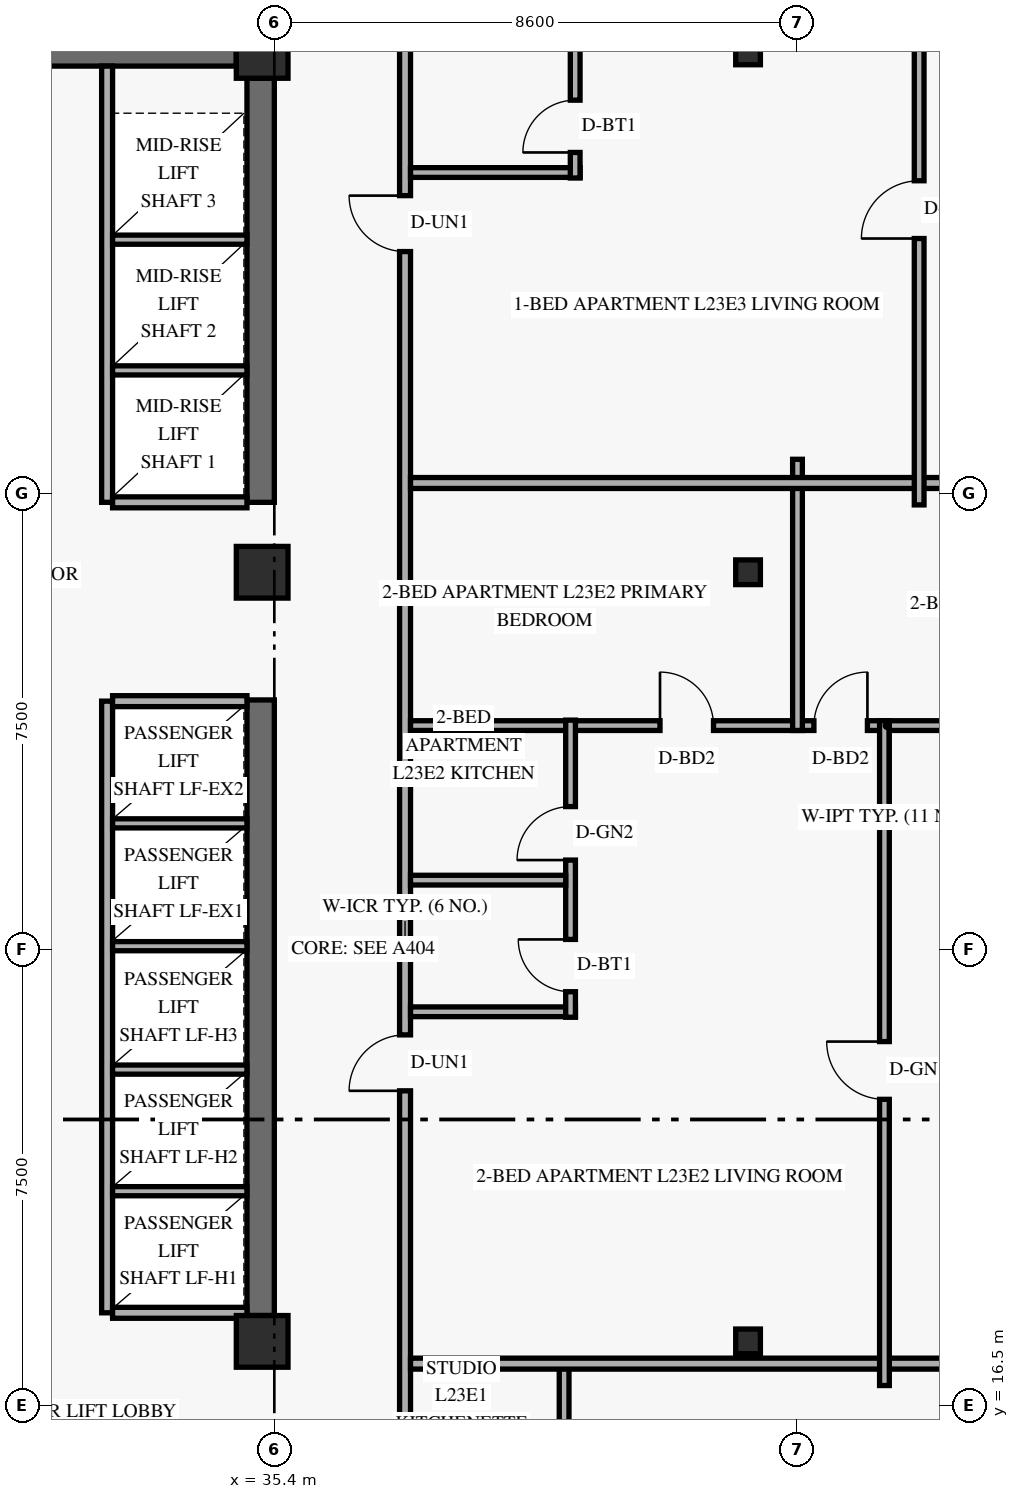
"""IFC4 building model, lengths in metres.
Left out: names, types, materials, properties, quantities, classifications, styles, units other than length and angle.
Written with IfcOpenShell. Run it as: python <this file> out.ifc"""

import sys

from ifc_helpers import new_model, si_unit, direction, frame, frame_2d, origin, origin_2d, place, context, subcontext, project, spatial, rectangle, hollow_rectangle, extrude, element, fill, save


model = new_model("IFC4")
c1 = context("Model", 3, precision=1e-05, world=origin(), true_north=direction((0.0, 1.0)))
c2 = subcontext(c1, "Body", "Model", "MODEL_VIEW")
j1 = project(units=[si_unit("LENGTHUNIT", "METRE"), si_unit("PLANEANGLEUNIT", "RADIAN")], contexts=[c1])
p1 = place(None, origin())
s1 = spatial("IfcSite", under=j1, at=p1, CompositionType="ELEMENT")
p2 = place(p1, origin())
s2 = spatial("IfcBuilding", under=s1, at=p2, CompositionType="ELEMENT")
p3 = place(p2, frame((0.0, 0.0, 91.2)))
s3 = spatial("IfcBuildingStorey", under=s2, at=p3, CompositionType="ELEMENT", Elevation=91.2)
p4 = place(p3, frame((35.175, 17.975, 0.0), z_axis=(0.0, 0.0, 1.0), x_axis=(0.0, 1.0, 0.0)))
e1 = element("IfcWall", 1, at=p4, inside=s3, PredefinedType="SHEAR", context=c2, shape_type="SweptSolid", body=[
    extrude(rectangle(XDim=10.125, YDim=0.45, at=frame_2d((5.062, 0.0))), origin(), (0.0, 0.0, 1.0), 2.749),
])
p5 = place(p3, frame((35.175, 31.35, 0.0), z_axis=(0.0, 0.0, 1.0), x_axis=(0.0, 1.0, 0.0)))
e2 = element("IfcWall", 2, at=p5, inside=s3, PredefinedType="SHEAR", context=c2, shape_type="SweptSolid", body=[
    extrude(rectangle(XDim=6.975, YDim=0.45, at=frame_2d((3.487, 0.0))), origin(), (0.0, 0.0, 1.0), 2.749),
])
p6 = place(p3, frame((24.625, 38.75, 0.0), z_axis=(0.0, 0.0, 1.0), x_axis=(1.0, 0.0, 0.0)))
e3 = element("IfcWall", 3, at=p6, inside=s3, PredefinedType="SHEAR", context=c2, shape_type="SweptSolid", body=[
    extrude(rectangle(XDim=10.15, YDim=0.45, at=frame_2d((5.075, 0.0))), origin(), (0.0, 0.0, 1.0), 3.36),
])
for number, where, z_axis, x_axis in (
    (4, (35.2, 17.55, 0.0), (0.0, 0.0, 1.0), (1.0, 0.0, 0.0)),
    (5, (35.2, 30.2, 0.0), (0.0, 0.0, 1.0), (1.0, 0.0, 0.0)),
    (6, (35.2, 38.75, 0.0), (0.0, 0.0, 1.0), (1.0, 0.0, 0.0)),
):
    element("IfcColumn", number, at=place(p3, frame(where, z_axis=z_axis, x_axis=x_axis)), inside=s3, PredefinedType="COLUMN", context=c2, shape_type="SweptSolid", body=[
        extrude(rectangle(XDim=0.85, YDim=0.85, at=origin_2d()), origin(), (0.0, 0.0, 1.0), 3.6),
    ])
for number, where, z_axis, x_axis in (
    (7, (43.128, 17.55, 0.0), (0.035, 0.0, 0.999), (0.0, 1.0, 0.0)),
    (8, (43.128, 30.2, 0.0), (0.035, 0.0, 0.999), (0.0, 1.0, 0.0)),
    (9, (43.128, 38.75, 0.0), (0.035, 0.0, 0.999), (0.0, 1.0, 0.0)),
):
    element("IfcColumn", number, at=place(p3, frame(where, z_axis=z_axis, x_axis=x_axis)), inside=s3, PredefinedType="COLUMN", context=c2, shape_type="SweptSolid", body=[
        extrude(hollow_rectangle(XDim=0.406, YDim=0.406, WallThickness=0.016, at=origin_2d()), origin(), (0.0, 0.0, 1.0), 3.602),
    ])
p7 = place(p3, frame((32.65, 18.02, 0.0), z_axis=(0.0, 0.0, 1.0), x_axis=(0.0, 1.0, 0.0)))
e10 = element("IfcWall", 10, at=p7, inside=s3, PredefinedType="STANDARD", context=c2, shape_type="SweptSolid", body=[
    extrude(rectangle(XDim=10.06, YDim=0.18, at=frame_2d((5.03, 0.0))), origin(), (0.0, 0.0, 1.0), 3.36),
])
for number, where, z_axis, x_axis in (
    (11, (32.74, 18.02, 0.0), (0.0, 0.0, 1.0), (1.0, 0.0, 0.0)),
    (12, (32.74, 28.08, 0.0), (0.0, 0.0, 1.0), (1.0, 0.0, 0.0)),
):
    element("IfcWall", number, at=place(p3, frame(where, z_axis=z_axis, x_axis=x_axis)), inside=s3, PredefinedType="STANDARD", context=c2, shape_type="SweptSolid", body=[
        extrude(rectangle(XDim=2.21, YDim=0.18, at=frame_2d((1.105, 0.0))), origin(), (0.0, 0.0, 1.0), 3.36),
    ])
for number, where, z_axis, x_axis in (
    (13, (32.74, 20.02, 0.0), (0.0, 0.0, 1.0), (1.0, 0.0, 0.0)),
    (14, (32.74, 22.02, 0.0), (0.0, 0.0, 1.0), (1.0, 0.0, 0.0)),
    (15, (32.74, 24.05, 0.0), (0.0, 0.0, 1.0), (1.0, 0.0, 0.0)),
    (16, (32.74, 26.07, 0.0), (0.0, 0.0, 1.0), (1.0, 0.0, 0.0)),
):
    element("IfcWall", number, at=place(p3, frame(where, z_axis=z_axis, x_axis=x_axis)), inside=s3, PredefinedType="STANDARD", context=c2, shape_type="SweptSolid", body=[
        extrude(rectangle(XDim=2.21, YDim=0.15, at=frame_2d((1.105, 0.0))), origin(), (0.0, 0.0, 1.0), 3.36),
    ])
p8 = place(p3, frame((32.65, 31.35, 0.0), z_axis=(0.0, 0.0, 1.0), x_axis=(0.0, 1.0, 0.0)))
e17 = element("IfcWall", 17, at=p8, inside=s3, PredefinedType="STANDARD", context=c2, shape_type="SweptSolid", body=[
    extrude(rectangle(XDim=7.175, YDim=0.18, at=frame_2d((3.587, 0.0))), origin(), (0.0, 0.0, 1.0), 3.36),
])
p9 = place(p3, frame((32.74, 31.35, 0.0), z_axis=(0.0, 0.0, 1.0), x_axis=(1.0, 0.0, 0.0)))
e18 = element("IfcWall", 18, at=p9, inside=s3, PredefinedType="STANDARD", context=c2, shape_type="SweptSolid", body=[
    extrude(rectangle(XDim=2.21, YDim=0.18, at=frame_2d((1.105, 0.0))), origin(), (0.0, 0.0, 1.0), 3.36),
])
for number, where, z_axis, x_axis in (
    (19, (32.74, 33.52, 0.0), (0.0, 0.0, 1.0), (1.0, 0.0, 0.0)),
    (20, (32.74, 35.67, 0.0), (0.0, 0.0, 1.0), (1.0, 0.0, 0.0)),
):
    element("IfcWall", number, at=place(p3, frame(where, z_axis=z_axis, x_axis=x_axis)), inside=s3, PredefinedType="STANDARD", context=c2, shape_type="SweptSolid", body=[
        extrude(rectangle(XDim=2.21, YDim=0.15, at=frame_2d((1.105, 0.0))), origin(), (0.0, 0.0, 1.0), 3.36),
    ])
p10 = place(p3, frame((37.55, 2.98, 0.0), z_axis=(0.0, 0.0, 1.0), x_axis=(0.0, 1.0, 0.0)))
e21 = element("IfcWall", 21, at=p10, inside=s3, PredefinedType="STANDARD", context=c2, shape_type="SweptSolid", body=[
    extrude(rectangle(XDim=42.04, YDim=0.18, at=frame_2d((21.02, 0.0))), origin(), (0.0, 0.0, 1.0), 2.731),
])
p11 = place(p10, frame((8.264, 0.0, 0.0)))
e22 = element("IfcOpeningElement", 22, at=p11, cuts=e21, PredefinedType="OPENING", context=c2, shape_type="SweptSolid", body=[
    extrude(rectangle(XDim=0.92, YDim=2.15, at=frame_2d((0.46, 1.075))), frame((0.0, 0.1, 0.0), z_axis=(0.0, -1.0, 0.0), x_axis=(1.0, 0.0, 0.0)), (0.0, 0.0, 1.0), 0.2),
])
p12 = place(p10, frame((18.691, 0.0, 0.0)))
e23 = element("IfcOpeningElement", 23, at=p12, cuts=e21, PredefinedType="OPENING", context=c2, shape_type="SweptSolid", body=[
    extrude(rectangle(XDim=0.92, YDim=2.15, at=frame_2d((0.46, 1.075))), frame((0.0, 0.1, 0.0), z_axis=(0.0, -1.0, 0.0), x_axis=(1.0, 0.0, 0.0)), (0.0, 0.0, 1.0), 0.2),
])
p13 = place(p10, frame((32.494, 0.0, 0.0)))
e24 = element("IfcOpeningElement", 24, at=p13, cuts=e21, PredefinedType="OPENING", context=c2, shape_type="SweptSolid", body=[
    extrude(rectangle(XDim=0.92, YDim=2.15, at=frame_2d((0.46, 1.075))), frame((0.0, 0.1, 0.0), z_axis=(0.0, -1.0, 0.0), x_axis=(1.0, 0.0, 0.0)), (0.0, 0.0, 1.0), 0.2),
])
p14 = place(p3, frame((35.42, 38.75, 0.0), z_axis=(0.0, 0.0, 1.0), x_axis=(0.0, 1.0, 0.0)))
e25 = element("IfcWall", 25, at=p14, inside=s3, PredefinedType="STANDARD", context=c2, shape_type="SweptSolid", body=[
    extrude(rectangle(XDim=0.51, YDim=0.18, at=frame_2d((0.255, 0.0))), origin(), (0.0, 0.0, 1.0), 2.731),
])
p15 = place(p3, frame((40.166, 12.454, 0.0), z_axis=(0.0, 0.0, 1.0), x_axis=(0.0, 1.0, 0.0)))
e26 = element("IfcWall", 26, at=p15, inside=s3, PredefinedType="PLUMBINGWALL", context=c2, shape_type="SweptSolid", body=[
    extrude(rectangle(XDim=4.73, YDim=0.16, at=frame_2d((2.365, 0.0))), origin(), (0.0, 0.0, 1.0), 2.988),
])
p16 = place(p15, frame((0.42, 0.0, 0.0)))
e27 = element("IfcOpeningElement", 27, at=p16, cuts=e26, PredefinedType="OPENING", context=c2, shape_type="SweptSolid", body=[
    extrude(rectangle(XDim=0.86, YDim=2.12, at=frame_2d((0.43, 1.06))), frame((0.0, 0.09, 0.0), z_axis=(0.0, -1.0, 0.0), x_axis=(1.0, 0.0, 0.0)), (0.0, 0.0, 1.0), 0.18),
])
p17 = place(p15, frame((2.513, 0.0, 0.0)))
e28 = element("IfcOpeningElement", 28, at=p17, cuts=e26, PredefinedType="OPENING", context=c2, shape_type="SweptSolid", body=[
    extrude(rectangle(XDim=0.88, YDim=2.12, at=frame_2d((0.44, 1.06))), frame((0.0, 0.09, 0.0), z_axis=(0.0, -1.0, 0.0), x_axis=(1.0, 0.0, 0.0)), (0.0, 0.0, 1.0), 0.18),
])
p18 = place(p3, frame((37.64, 17.184, 0.0), z_axis=(0.0, 0.0, 1.0), x_axis=(1.0, 0.0, 0.0)))
e29 = element("IfcWall", 29, at=p18, inside=s3, PredefinedType="PARTITIONING", context=c2, shape_type="SweptSolid", body=[
    extrude(rectangle(XDim=15.68, YDim=0.18, at=frame_2d((7.84, 0.0))), origin(), (0.0, 0.0, 1.0), 2.731),
])
p19 = place(p3, frame((37.64, 27.678, 0.0), z_axis=(0.0, 0.0, 1.0), x_axis=(1.0, 0.0, 0.0)))
e30 = element("IfcWall", 30, at=p19, inside=s3, PredefinedType="PARTITIONING", context=c2, shape_type="SweptSolid", body=[
    extrude(rectangle(XDim=15.68, YDim=0.16, at=frame_2d((7.84, 0.0))), origin(), (0.0, 0.0, 1.0), 2.731),
])
p20 = place(p19, frame((4.103, 0.0, 0.0)))
e31 = element("IfcOpeningElement", 31, at=p20, cuts=e30, PredefinedType="OPENING", context=c2, shape_type="SweptSolid", body=[
    extrude(rectangle(XDim=0.88, YDim=2.14, at=frame_2d((0.44, 1.07))), frame((0.0, 0.09, 0.0), z_axis=(0.0, -1.0, 0.0), x_axis=(1.0, 0.0, 0.0)), (0.0, 0.0, 1.0), 0.18),
])
p21 = place(p19, frame((6.634, 0.0, 0.0)))
e32 = element("IfcOpeningElement", 32, at=p21, cuts=e30, PredefinedType="OPENING", context=c2, shape_type="SweptSolid", body=[
    extrude(rectangle(XDim=0.88, YDim=2.14, at=frame_2d((0.44, 1.07))), frame((0.0, 0.09, 0.0), z_axis=(0.0, -1.0, 0.0), x_axis=(1.0, 0.0, 0.0)), (0.0, 0.0, 1.0), 0.18),
])
p22 = place(p3, frame((37.64, 22.971, 0.0), z_axis=(0.0, 0.0, 1.0), x_axis=(1.0, 0.0, 0.0)))
e33 = element("IfcWall", 33, at=p22, inside=s3, PredefinedType="PLUMBINGWALL", context=c2, shape_type="SweptSolid", body=[
    extrude(rectangle(XDim=2.712, YDim=0.16, at=frame_2d((1.356, 0.0))), origin(), (0.0, 0.0, 1.0), 3.36),
])
p23 = place(p3, frame((40.272, 22.881, 0.0), z_axis=(0.0, 0.0, 1.0), x_axis=(0.0, 1.0, 0.0)))
e34 = element("IfcWall", 34, at=p23, inside=s3, PredefinedType="PLUMBINGWALL", context=c2, shape_type="SweptSolid", body=[
    extrude(rectangle(XDim=4.887, YDim=0.16, at=frame_2d((2.443, 0.0))), origin(), (0.0, 0.0, 1.0), 3.36),
])
p24 = place(p23, frame((0.42, 0.0, 0.0)))
e35 = element("IfcOpeningElement", 35, at=p24, cuts=e34, PredefinedType="OPENING", context=c2, shape_type="SweptSolid", body=[
    extrude(rectangle(XDim=0.86, YDim=2.12, at=frame_2d((0.43, 1.06))), frame((0.0, 0.09, 0.0), z_axis=(0.0, -1.0, 0.0), x_axis=(1.0, 0.0, 0.0)), (0.0, 0.0, 1.0), 0.18),
])
p25 = place(p23, frame((2.585, 0.0, 0.0)))
e36 = element("IfcOpeningElement", 36, at=p25, cuts=e34, PredefinedType="OPENING", context=c2, shape_type="SweptSolid", body=[
    extrude(rectangle(XDim=0.88, YDim=2.12, at=frame_2d((0.44, 1.06))), frame((0.0, 0.09, 0.0), z_axis=(0.0, -1.0, 0.0), x_axis=(1.0, 0.0, 0.0)), (0.0, 0.0, 1.0), 0.18),
])
p26 = place(p3, frame((37.64, 25.136, 0.0), z_axis=(0.0, 0.0, 1.0), x_axis=(1.0, 0.0, 0.0)))
e37 = element("IfcWall", 37, at=p26, inside=s3, PredefinedType="PLUMBINGWALL", context=c2, shape_type="SweptSolid", body=[
    extrude(rectangle(XDim=2.552, YDim=0.16, at=frame_2d((1.276, 0.0))), origin(), (0.0, 0.0, 1.0), 3.36),
])
p27 = place(p3, frame((45.434, 16.824, 0.0), z_axis=(0.0, 0.0, 1.0), x_axis=(0.0, 1.0, 0.0)))
e38 = element("IfcWall", 38, at=p27, inside=s3, PredefinedType="PARTITIONING", context=c2, shape_type="SweptSolid", body=[
    extrude(rectangle(XDim=10.934, YDim=0.16, at=frame_2d((5.467, 0.0))), origin(), (0.0, 0.0, 1.0), 2.731),
])
p28 = place(p27, frame((4.707, 0.0, 0.0)))
e39 = element("IfcOpeningElement", 39, at=p28, cuts=e38, PredefinedType="OPENING", context=c2, shape_type="SweptSolid", body=[
    extrude(rectangle(XDim=0.95, YDim=2.15, at=frame_2d((0.475, 1.075))), frame((0.0, 0.09, 0.0), z_axis=(0.0, -1.0, 0.0), x_axis=(1.0, 0.0, 0.0)), (0.0, 0.0, 1.0), 0.18),
])
p29 = place(p3, frame((44.004, 27.598, 0.0), z_axis=(0.0, 0.0, 1.0), x_axis=(0.0, 1.0, 0.0)))
e40 = element("IfcWall", 40, at=p29, inside=s3, PredefinedType="PARTITIONING", context=c2, shape_type="SweptSolid", body=[
    extrude(rectangle(XDim=4.46, YDim=0.16, at=frame_2d((2.23, 0.0))), origin(), (0.0, 0.0, 1.0), 2.731),
])
p30 = place(p3, frame((37.64, 31.668, 0.0), z_axis=(0.0, 0.0, 1.0), x_axis=(1.0, 0.0, 0.0)))
e41 = element("IfcWall", 41, at=p30, inside=s3, PredefinedType="PARTITIONING", context=c2, shape_type="SweptSolid", body=[
    extrude(rectangle(XDim=15.68, YDim=0.18, at=frame_2d((7.84, 0.0))), origin(), (0.0, 0.0, 1.0), 2.731),
])
p31 = place(p3, frame((37.64, 36.774, 0.0), z_axis=(0.0, 0.0, 1.0), x_axis=(1.0, 0.0, 0.0)))
e42 = element("IfcWall", 42, at=p31, inside=s3, PredefinedType="PLUMBINGWALL", context=c2, shape_type="SweptSolid", body=[
    extrude(rectangle(XDim=2.788, YDim=0.16, at=frame_2d((1.394, 0.0))), origin(), (0.0, 0.0, 1.0), 3.36),
])
p32 = place(p3, frame((40.348, 36.685, 0.0), z_axis=(0.0, 0.0, 1.0), x_axis=(0.0, 1.0, 0.0)))
e43 = element("IfcWall", 43, at=p32, inside=s3, PredefinedType="PLUMBINGWALL", context=c2, shape_type="SweptSolid", body=[
    extrude(rectangle(XDim=4.916, YDim=0.16, at=frame_2d((2.458, 0.0))), origin(), (0.0, 0.0, 1.0), 2.731),
])
p33 = place(p32, frame((0.42, 0.0, 0.0)))
e44 = element("IfcOpeningElement", 44, at=p33, cuts=e43, PredefinedType="OPENING", context=c2, shape_type="SweptSolid", body=[
    extrude(rectangle(XDim=0.86, YDim=2.12, at=frame_2d((0.43, 1.06))), frame((0.0, 0.09, 0.0), z_axis=(0.0, -1.0, 0.0), x_axis=(1.0, 0.0, 0.0)), (0.0, 0.0, 1.0), 0.18),
])
p34 = place(p32, frame((2.598, 0.0, 0.0)))
e45 = element("IfcOpeningElement", 45, at=p34, cuts=e43, PredefinedType="OPENING", context=c2, shape_type="SweptSolid", body=[
    extrude(rectangle(XDim=0.88, YDim=2.12, at=frame_2d((0.44, 1.06))), frame((0.0, 0.09, 0.0), z_axis=(0.0, -1.0, 0.0), x_axis=(1.0, 0.0, 0.0)), (0.0, 0.0, 1.0), 0.18),
])
p35 = place(p3, frame((46.005, 31.308, 0.0), z_axis=(0.0, 0.0, 1.0), x_axis=(0.0, 1.0, 0.0)))
e46 = element("IfcWall", 46, at=p35, inside=s3, PredefinedType="PARTITIONING", context=c2, shape_type="SweptSolid", body=[
    extrude(rectangle(XDim=10.282, YDim=0.16, at=frame_2d((5.141, 0.0))), origin(), (0.0, 0.0, 1.0), 2.731),
])
p36 = place(p35, frame((4.381, 0.0, 0.0)))
e47 = element("IfcOpeningElement", 47, at=p36, cuts=e46, PredefinedType="OPENING", context=c2, shape_type="SweptSolid", body=[
    extrude(rectangle(XDim=0.95, YDim=2.15, at=frame_2d((0.475, 1.075))), frame((0.0, 0.09, 0.0), z_axis=(0.0, -1.0, 0.0), x_axis=(1.0, 0.0, 0.0)), (0.0, 0.0, 1.0), 0.18),
])
p37 = place(p28, origin())
e48 = element("IfcDoor", 48, at=p37, inside=s3, OperationType="SINGLE_SWING_RIGHT", PredefinedType="DOOR", context=c2, shape_type="SweptSolid", body=[
    extrude(rectangle(XDim=0.95, YDim=2.15, at=frame_2d((0.475, 1.075))), frame((0.0, 0.025, 0.0), z_axis=(0.0, -1.0, 0.0), x_axis=(1.0, 0.0, 0.0)), (0.0, 0.0, 1.0), 0.05),
])
fill(e39, e48)
p38 = place(p12, origin())
e49 = element("IfcDoor", 49, at=p38, inside=s3, OperationType="SINGLE_SWING_LEFT", PredefinedType="DOOR", context=c2, shape_type="SweptSolid", body=[
    extrude(rectangle(XDim=0.92, YDim=2.15, at=frame_2d((0.46, 1.075))), frame((0.0, 0.025, 0.0), z_axis=(0.0, -1.0, 0.0), x_axis=(1.0, 0.0, 0.0)), (0.0, 0.0, 1.0), 0.05),
])
fill(e23, e49)
p39 = place(p24, origin())
e50 = element("IfcDoor", 50, at=p39, inside=s3, OperationType="SINGLE_SWING_RIGHT", PredefinedType="DOOR", context=c2, shape_type="SweptSolid", body=[
    extrude(rectangle(XDim=0.86, YDim=2.12, at=frame_2d((0.43, 1.06))), frame((0.0, 0.025, 0.0), z_axis=(0.0, -1.0, 0.0), x_axis=(1.0, 0.0, 0.0)), (0.0, 0.0, 1.0), 0.05),
])
fill(e35, e50)
p40 = place(p25, origin())
e51 = element("IfcDoor", 51, at=p40, inside=s3, OperationType="SINGLE_SWING_LEFT", PredefinedType="DOOR", context=c2, shape_type="SweptSolid", body=[
    extrude(rectangle(XDim=0.88, YDim=2.12, at=frame_2d((0.44, 1.06))), frame((0.0, 0.025, 0.0), z_axis=(0.0, -1.0, 0.0), x_axis=(1.0, 0.0, 0.0)), (0.0, 0.0, 1.0), 0.05),
])
fill(e36, e51)
p41 = place(p20, origin())
e52 = element("IfcDoor", 52, at=p41, inside=s3, OperationType="SINGLE_SWING_LEFT", PredefinedType="DOOR", context=c2, shape_type="SweptSolid", body=[
    extrude(rectangle(XDim=0.88, YDim=2.14, at=frame_2d((0.44, 1.07))), frame((0.0, 0.025, 0.0), z_axis=(0.0, -1.0, 0.0), x_axis=(1.0, 0.0, 0.0)), (0.0, 0.0, 1.0), 0.05),
])
fill(e31, e52)
p42 = place(p21, origin())
e53 = element("IfcDoor", 53, at=p42, inside=s3, OperationType="SINGLE_SWING_RIGHT", PredefinedType="DOOR", context=c2, shape_type="SweptSolid", body=[
    extrude(rectangle(XDim=0.88, YDim=2.14, at=frame_2d((0.44, 1.07))), frame((0.0, 0.025, 0.0), z_axis=(0.0, -1.0, 0.0), x_axis=(1.0, 0.0, 0.0)), (0.0, 0.0, 1.0), 0.05),
])
fill(e32, e53)
p43 = place(p36, origin())
e54 = element("IfcDoor", 54, at=p43, inside=s3, OperationType="SINGLE_SWING_LEFT", PredefinedType="DOOR", context=c2, shape_type="SweptSolid", body=[
    extrude(rectangle(XDim=0.95, YDim=2.15, at=frame_2d((0.475, 1.075))), frame((0.0, 0.025, 0.0), z_axis=(0.0, -1.0, 0.0), x_axis=(1.0, 0.0, 0.0)), (0.0, 0.0, 1.0), 0.05),
])
fill(e47, e54)
p44 = place(p13, origin())
e55 = element("IfcDoor", 55, at=p44, inside=s3, OperationType="SINGLE_SWING_RIGHT", PredefinedType="DOOR", context=c2, shape_type="SweptSolid", body=[
    extrude(rectangle(XDim=0.92, YDim=2.15, at=frame_2d((0.46, 1.075))), frame((0.0, 0.025, 0.0), z_axis=(0.0, -1.0, 0.0), x_axis=(1.0, 0.0, 0.0)), (0.0, 0.0, 1.0), 0.05),
])
fill(e24, e55)
p45 = place(p33, origin())
e56 = element("IfcDoor", 56, at=p45, inside=s3, OperationType="SINGLE_SWING_LEFT", PredefinedType="DOOR", context=c2, shape_type="SweptSolid", body=[
    extrude(rectangle(XDim=0.86, YDim=2.12, at=frame_2d((0.43, 1.06))), frame((0.0, 0.025, 0.0), z_axis=(0.0, -1.0, 0.0), x_axis=(1.0, 0.0, 0.0)), (0.0, 0.0, 1.0), 0.05),
])
fill(e44, e56)
save(model, sys.argv[1])
